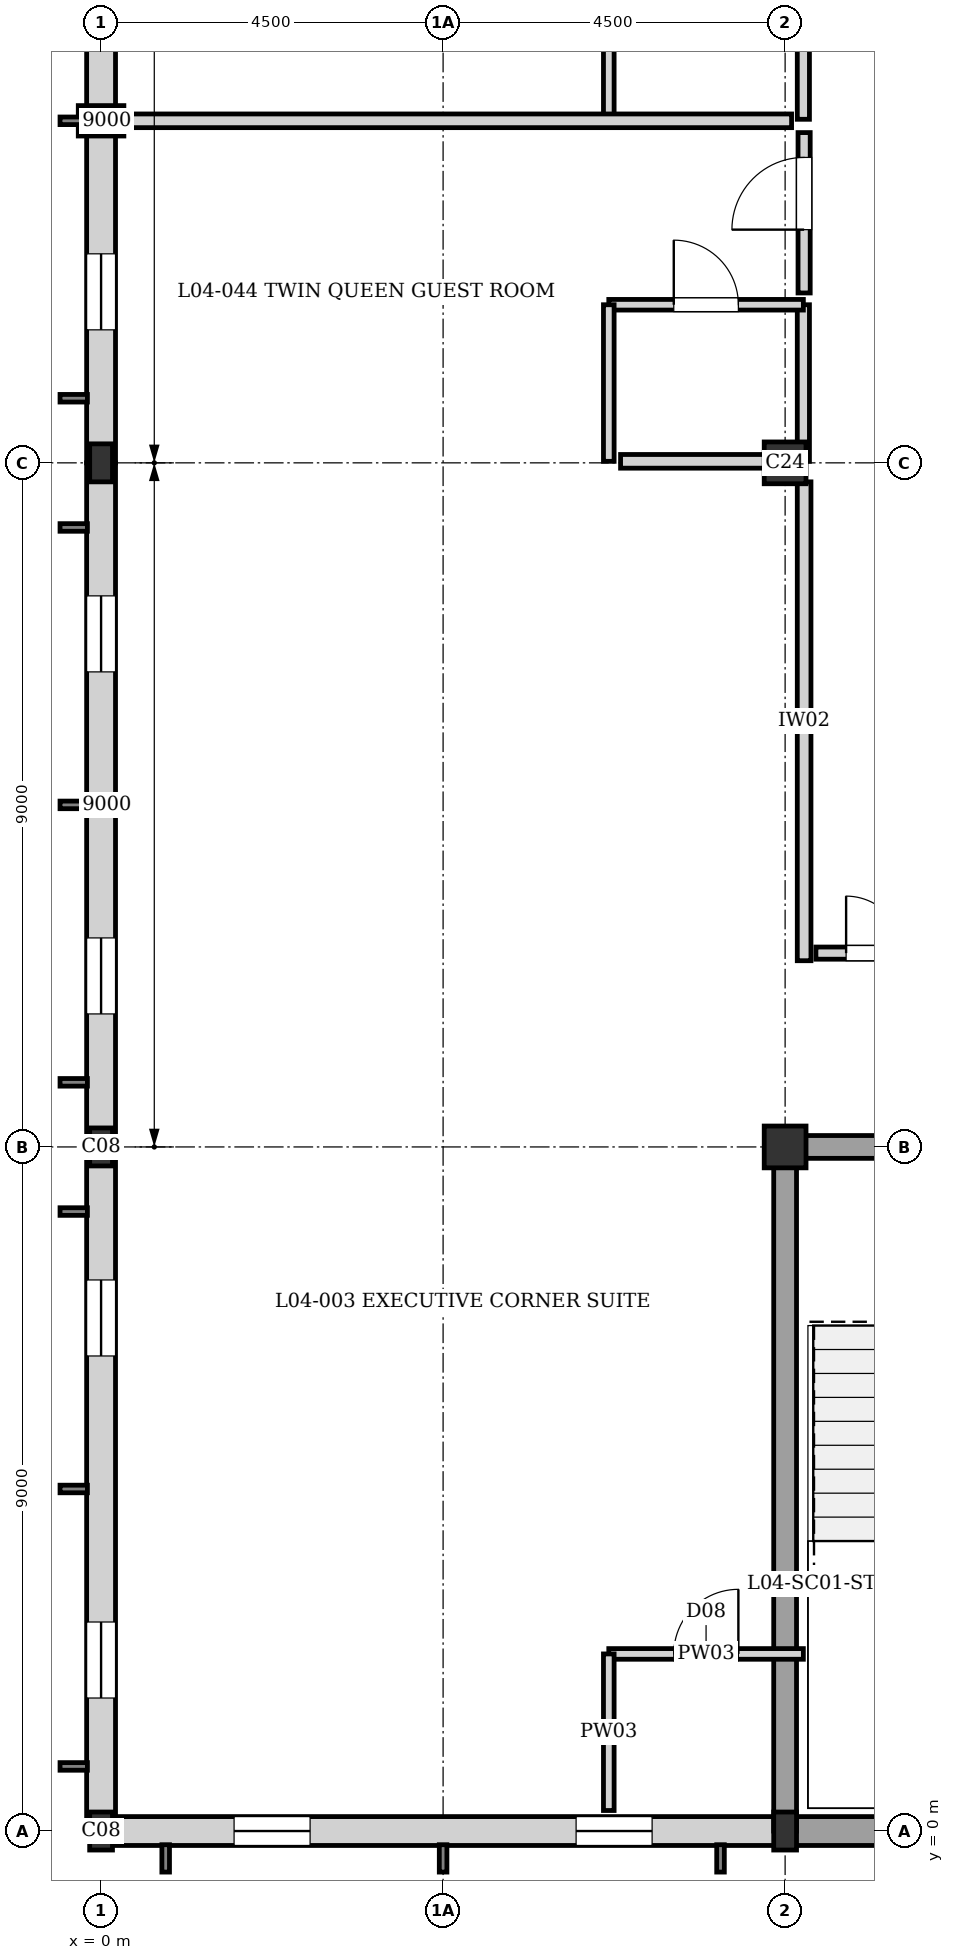
"""IFC4 building model, lengths in metres.
Left out: names, types, materials, properties, quantities, classifications, styles, units other than length and angle.
Written with IfcOpenShell. Run it as: python <this file> out.ifc"""

import sys

from ifc_helpers import new_model, si_unit, direction, frame, frame_2d, origin, origin_2d, place, context, subcontext, project, spatial, rectangle, i_section, extrude, element, fill, save


model = new_model("IFC4")
c1 = context("Model", 3, precision=1e-05, world=origin(), true_north=direction((0.0, 1.0)))
c2 = subcontext(c1, "Body", "Model", "MODEL_VIEW")
j1 = project(units=[si_unit("LENGTHUNIT", "METRE"), si_unit("PLANEANGLEUNIT", "RADIAN")], contexts=[c1])
p1 = place(None, origin())
s1 = spatial("IfcSite", under=j1, at=p1, CompositionType="ELEMENT")
p2 = place(p1, origin())
s2 = spatial("IfcBuilding", under=s1, at=p2, CompositionType="ELEMENT")
p3 = place(p2, frame((0.0, 0.0, 14.56)))
s3 = spatial("IfcBuildingStorey", under=s2, at=p3, CompositionType="ELEMENT", Elevation=14.56)
for number, where, z_axis, x_axis in (
    (1, (0.0, 0.0, 0.0), (0.0, 0.0, 1.0), (1.0, 0.0, 0.0)),
    (2, (0.0, 9.0, 0.0), (0.0, 0.0, 1.0), (1.0, 0.0, 0.0)),
    (3, (0.0, 18.0, 0.0), (0.0, 0.0, 1.0), (1.0, 0.0, 0.0)),
    (4, (9.0, 0.0, 0.0), (0.0, 0.0, 1.0), (1.0, 0.0, 0.0)),
):
    element("IfcColumn", number, at=place(p3, frame(where, z_axis=z_axis, x_axis=x_axis)), inside=s3, PredefinedType="COLUMN", context=c2, shape_type="SweptSolid", body=[
        extrude(i_section(OverallWidth=0.3, OverallDepth=0.5, WebThickness=0.014, FlangeThickness=0.028, at=origin_2d()), origin(), (0.0, 0.0, 1.0), 3.04),
    ])
for number, where, z_axis, x_axis in (
    (5, (9.0, 9.0, 0.0), (0.0, 0.0, 1.0), (1.0, 0.0, 0.0)),
    (6, (9.0, 18.0, 0.0), (0.0, 0.0, 1.0), (1.0, 0.0, 0.0)),
):
    element("IfcColumn", number, at=place(p3, frame(where, z_axis=z_axis, x_axis=x_axis)), inside=s3, PredefinedType="COLUMN", context=c2, shape_type="SweptSolid", body=[
        extrude(rectangle(XDim=0.55, YDim=0.55, at=origin_2d()), origin(), (0.0, 0.0, 1.0), 3.04),
    ])
p4 = place(p3, frame((0.0, 22.5, 0.0), z_axis=(0.0, 0.0, 1.0), x_axis=(0.0, 1.0, 0.0)))
e7 = element("IfcColumn", 7, at=p4, inside=s3, PredefinedType="PILASTER", context=c2, shape_type="SweptSolid", body=[
    extrude(rectangle(XDim=0.4, YDim=0.6, at=origin_2d()), origin(), (0.0, 0.0, 1.0), 3.04),
])
p5 = place(p3, frame((18.0, 0.0, 0.0), z_axis=(0.0, 0.0, 1.0), x_axis=(-1.0, 0.0, 0.0)))
e8 = element("IfcWall", 8, at=p5, inside=s3, PredefinedType="SOLIDWALL", context=c2, shape_type="SweptSolid", body=[
    extrude(rectangle(XDim=9.0, YDim=0.38, at=frame_2d((4.5, 0.0))), origin(), (0.0, 0.0, 1.0), 2.82),
])
p6 = place(p3, frame((8.87, 0.0, 0.0), z_axis=(0.0, 0.0, 1.0), x_axis=(-1.0, 0.0, 0.0)))
e9 = element("IfcWall", 9, at=p6, inside=s3, PredefinedType="SOLIDWALL", context=c2, shape_type="SweptSolid", body=[
    extrude(rectangle(XDim=8.87, YDim=0.38, at=frame_2d((4.435, 0.0))), origin(), (0.0, 0.0, 1.0), 2.42),
])
p7 = place(p6, frame((1.62, 0.0, 0.35)))
e10 = element("IfcOpeningElement", 10, at=p7, cuts=e9, PredefinedType="OPENING", context=c2, shape_type="SweptSolid", body=[
    extrude(rectangle(XDim=1.0, YDim=1.6, at=frame_2d((0.5, 0.8))), frame((0.0, 0.2, 0.0), z_axis=(0.0, -1.0, 0.0), x_axis=(1.0, 0.0, 0.0)), (0.0, 0.0, 1.0), 0.4),
])
p8 = place(p6, frame((6.12, 0.0, 0.35)))
e11 = element("IfcOpeningElement", 11, at=p8, cuts=e9, PredefinedType="OPENING", context=c2, shape_type="SweptSolid", body=[
    extrude(rectangle(XDim=1.0, YDim=1.6, at=frame_2d((0.5, 0.8))), frame((0.0, 0.2, 0.0), z_axis=(0.0, -1.0, 0.0), x_axis=(1.0, 0.0, 0.0)), (0.0, 0.0, 1.0), 0.4),
])
p9 = place(p3, frame((0.0, 0.155, 0.0), z_axis=(0.0, 0.0, 1.0), x_axis=(0.0, 1.0, 0.0)))
e12 = element("IfcWall", 12, at=p9, inside=s3, PredefinedType="SOLIDWALL", context=c2, shape_type="SweptSolid", body=[
    extrude(rectangle(XDim=8.845, YDim=0.38, at=frame_2d((4.422, 0.0))), origin(), (0.0, 0.0, 1.0), 2.38),
])
p10 = place(p9, frame((1.595, 0.0, 0.35)))
e13 = element("IfcOpeningElement", 13, at=p10, cuts=e12, PredefinedType="OPENING", context=c2, shape_type="SweptSolid", body=[
    extrude(rectangle(XDim=1.0, YDim=1.6, at=frame_2d((0.5, 0.8))), frame((0.0, 0.2, 0.0), z_axis=(0.0, -1.0, 0.0), x_axis=(1.0, 0.0, 0.0)), (0.0, 0.0, 1.0), 0.4),
])
p11 = place(p9, frame((6.095, 0.0, 0.35)))
e14 = element("IfcOpeningElement", 14, at=p11, cuts=e12, PredefinedType="OPENING", context=c2, shape_type="SweptSolid", body=[
    extrude(rectangle(XDim=1.0, YDim=1.6, at=frame_2d((0.5, 0.8))), frame((0.0, 0.2, 0.0), z_axis=(0.0, -1.0, 0.0), x_axis=(1.0, 0.0, 0.0)), (0.0, 0.0, 1.0), 0.4),
])
p12 = place(p3, frame((0.0, 9.0, 0.0), z_axis=(0.0, 0.0, 1.0), x_axis=(0.0, 1.0, 0.0)))
e15 = element("IfcWall", 15, at=p12, inside=s3, PredefinedType="SOLIDWALL", context=c2, shape_type="SweptSolid", body=[
    extrude(rectangle(XDim=9.0, YDim=0.38, at=frame_2d((4.5, 0.0))), origin(), (0.0, 0.0, 1.0), 2.82),
])
p13 = place(p12, frame((1.75, 0.0, 0.35)))
e16 = element("IfcOpeningElement", 16, at=p13, cuts=e15, PredefinedType="OPENING", context=c2, shape_type="SweptSolid", body=[
    extrude(rectangle(XDim=1.0, YDim=1.6, at=frame_2d((0.5, 0.8))), frame((0.0, 0.2, 0.0), z_axis=(0.0, -1.0, 0.0), x_axis=(1.0, 0.0, 0.0)), (0.0, 0.0, 1.0), 0.4),
])
p14 = place(p12, frame((6.25, 0.0, 0.35)))
e17 = element("IfcOpeningElement", 17, at=p14, cuts=e15, PredefinedType="OPENING", context=c2, shape_type="SweptSolid", body=[
    extrude(rectangle(XDim=1.0, YDim=1.6, at=frame_2d((0.5, 0.8))), frame((0.0, 0.2, 0.0), z_axis=(0.0, -1.0, 0.0), x_axis=(1.0, 0.0, 0.0)), (0.0, 0.0, 1.0), 0.4),
])
p15 = place(p3, frame((0.0, 18.0, 0.0), z_axis=(0.0, 0.0, 1.0), x_axis=(0.0, 1.0, 0.0)))
e18 = element("IfcWall", 18, at=p15, inside=s3, PredefinedType="SOLIDWALL", context=c2, shape_type="SweptSolid", body=[
    extrude(rectangle(XDim=9.0, YDim=0.38, at=frame_2d((4.5, 0.0))), origin(), (0.0, 0.0, 1.0), 2.48),
])
p16 = place(p15, frame((1.75, 0.0, 0.35)))
e19 = element("IfcOpeningElement", 19, at=p16, cuts=e18, PredefinedType="OPENING", context=c2, shape_type="SweptSolid", body=[
    extrude(rectangle(XDim=1.0, YDim=1.6, at=frame_2d((0.5, 0.8))), frame((0.0, 0.2, 0.0), z_axis=(0.0, -1.0, 0.0), x_axis=(1.0, 0.0, 0.0)), (0.0, 0.0, 1.0), 0.4),
])
p17 = place(p15, frame((6.25, 0.0, 0.35)))
e20 = element("IfcOpeningElement", 20, at=p17, cuts=e18, PredefinedType="OPENING", context=c2, shape_type="SweptSolid", body=[
    extrude(rectangle(XDim=1.0, YDim=1.6, at=frame_2d((0.5, 0.8))), frame((0.0, 0.2, 0.0), z_axis=(0.0, -1.0, 0.0), x_axis=(1.0, 0.0, 0.0)), (0.0, 0.0, 1.0), 0.4),
])
p18 = place(p3, frame((9.0, 9.0, 0.0), z_axis=(0.0, 0.0, 1.0), x_axis=(1.0, 0.0, 0.0)))
e21 = element("IfcWall", 21, at=p18, inside=s3, PredefinedType="SHEAR", context=c2, shape_type="SweptSolid", body=[
    extrude(rectangle(XDim=9.0, YDim=0.3, at=frame_2d((4.5, 0.0))), origin(), (0.0, 0.0, 1.0), 2.82),
])
p19 = place(p18, frame((5.95, 0.0, 0.0)))
e22 = element("IfcOpeningElement", 22, at=p19, cuts=e21, PredefinedType="OPENING", context=c2, shape_type="SweptSolid", body=[
    extrude(rectangle(XDim=1.6, YDim=2.1, at=frame_2d((0.8, 1.05))), frame((0.0, 0.16, 0.0), z_axis=(0.0, -1.0, 0.0), x_axis=(1.0, 0.0, 0.0)), (0.0, 0.0, 1.0), 0.32),
])
p20 = place(p3, frame((9.0, 0.0, 0.0), z_axis=(0.0, 0.0, 1.0), x_axis=(0.0, 1.0, 0.0)))
e23 = element("IfcWall", 23, at=p20, inside=s3, PredefinedType="SHEAR", context=c2, shape_type="SweptSolid", body=[
    extrude(rectangle(XDim=9.0, YDim=0.3, at=frame_2d((4.5, 0.0))), origin(), (0.0, 0.0, 1.0), 2.82),
])
p21 = place(p3, frame((6.68, 2.33, 0.0), z_axis=(0.0, 0.0, 1.0), x_axis=(1.0, 0.0, 0.0)))
e24 = element("IfcWall", 24, at=p21, inside=s3, PredefinedType="PLUMBINGWALL", context=c2, shape_type="SweptSolid", body=[
    extrude(rectangle(XDim=2.56, YDim=0.14, at=frame_2d((1.28, 0.0))), origin(), (0.0, 0.0, 1.0), 2.82),
])
p22 = place(p21, frame((0.855, 0.0, 0.0)))
e25 = element("IfcOpeningElement", 25, at=p22, cuts=e24, PredefinedType="OPENING", context=c2, shape_type="SweptSolid", body=[
    extrude(rectangle(XDim=0.85, YDim=2.04, at=frame_2d((0.425, 1.02))), frame((0.0, 0.08, 0.0), z_axis=(0.0, -1.0, 0.0), x_axis=(1.0, 0.0, 0.0)), (0.0, 0.0, 1.0), 0.16),
])
p23 = place(p3, frame((6.68, 0.27, 0.0), z_axis=(0.0, 0.0, 1.0), x_axis=(0.0, 1.0, 0.0)))
e26 = element("IfcWall", 26, at=p23, inside=s3, PredefinedType="PLUMBINGWALL", context=c2, shape_type="SweptSolid", body=[
    extrude(rectangle(XDim=2.06, YDim=0.14, at=frame_2d((1.03, 0.0))), origin(), (0.0, 0.0, 1.0), 2.82),
])
p24 = place(p3, frame((9.24, 18.02, 0.0), z_axis=(0.0, 0.0, 1.0), x_axis=(0.0, 1.0, 0.0)))
e27 = element("IfcWall", 27, at=p24, inside=s3, PredefinedType="PARTITIONING", context=c2, shape_type="SweptSolid", body=[
    extrude(rectangle(XDim=2.06, YDim=0.16, at=frame_2d((1.03, 0.0))), origin(), (0.0, 0.0, 1.0), 2.82),
])
p25 = place(p3, frame((6.68, 20.08, 0.0), z_axis=(0.0, 0.0, 1.0), x_axis=(1.0, 0.0, 0.0)))
e28 = element("IfcWall", 28, at=p25, inside=s3, PredefinedType="PLUMBINGWALL", context=c2, shape_type="SweptSolid", body=[
    extrude(rectangle(XDim=2.56, YDim=0.14, at=frame_2d((1.28, 0.0))), origin(), (0.0, 0.0, 1.0), 2.82),
])
p26 = place(p25, frame((0.855, 0.0, 0.0)))
e29 = element("IfcOpeningElement", 29, at=p26, cuts=e28, PredefinedType="OPENING", context=c2, shape_type="SweptSolid", body=[
    extrude(rectangle(XDim=0.85, YDim=2.04, at=frame_2d((0.425, 1.02))), frame((0.0, 0.08, 0.0), z_axis=(0.0, -1.0, 0.0), x_axis=(1.0, 0.0, 0.0)), (0.0, 0.0, 1.0), 0.16),
])
p27 = place(p3, frame((6.68, 18.02, 0.0), z_axis=(0.0, 0.0, 1.0), x_axis=(0.0, 1.0, 0.0)))
e30 = element("IfcWall", 30, at=p27, inside=s3, PredefinedType="PLUMBINGWALL", context=c2, shape_type="SweptSolid", body=[
    extrude(rectangle(XDim=2.06, YDim=0.14, at=frame_2d((1.03, 0.0))), origin(), (0.0, 0.0, 1.0), 2.82),
])
p28 = place(p3, frame((9.24, 22.52, 0.0), z_axis=(0.0, 0.0, 1.0), x_axis=(0.0, 1.0, 0.0)))
e31 = element("IfcWall", 31, at=p28, inside=s3, PredefinedType="PARTITIONING", context=c2, shape_type="SweptSolid", body=[
    extrude(rectangle(XDim=2.06, YDim=0.16, at=frame_2d((1.03, 0.0))), origin(), (0.0, 0.0, 1.0), 2.82),
])
p29 = place(p3, frame((6.68, 22.52, 0.0), z_axis=(0.0, 0.0, 1.0), x_axis=(0.0, 1.0, 0.0)))
e32 = element("IfcWall", 32, at=p29, inside=s3, PredefinedType="PLUMBINGWALL", context=c2, shape_type="SweptSolid", body=[
    extrude(rectangle(XDim=2.06, YDim=0.14, at=frame_2d((1.03, 0.0))), origin(), (0.0, 0.0, 1.0), 2.82),
])
p30 = place(p3, frame((9.25, 11.45, 0.0), z_axis=(0.0, 0.0, 1.0), x_axis=(0.0, 1.0, 0.0)))
e33 = element("IfcWall", 33, at=p30, inside=s3, PredefinedType="PARTITIONING", context=c2, shape_type="SweptSolid", body=[
    extrude(rectangle(XDim=6.3, YDim=0.18, at=frame_2d((3.15, 0.0))), origin(), (0.0, 0.0, 1.0), 2.82),
])
p31 = place(p3, frame((0.195, 22.5, 0.0), z_axis=(0.0, 0.0, 1.0), x_axis=(1.0, 0.0, 0.0)))
e34 = element("IfcWall", 34, at=p31, inside=s3, PredefinedType="PARTITIONING", context=c2, shape_type="SweptSolid", body=[
    extrude(rectangle(XDim=8.89, YDim=0.18, at=frame_2d((4.445, 0.0))), origin(), (0.0, 0.0, 1.0), 2.82),
])
p32 = place(p3, frame((6.835, 18.02, 0.0), z_axis=(0.0, 0.0, 1.0), x_axis=(1.0, 0.0, 0.0)))
e35 = element("IfcWall", 35, at=p32, inside=s3, PredefinedType="PARTITIONING", context=c2, shape_type="SweptSolid", body=[
    extrude(rectangle(XDim=2.26, YDim=0.18, at=frame_2d((1.13, 0.0))), origin(), (0.0, 0.0, 1.0), 2.42),
])
p33 = place(p3, frame((9.405, 11.55, 0.0), z_axis=(0.0, 0.0, 1.0), x_axis=(1.0, 0.0, 0.0)))
e36 = element("IfcWall", 36, at=p33, inside=s3, PredefinedType="PARTITIONING", context=c2, shape_type="SweptSolid", body=[
    extrude(rectangle(XDim=2.295, YDim=0.16, at=frame_2d((1.147, 0.0))), origin(), (0.0, 0.0, 1.0), 2.82),
])
p34 = place(p33, frame((0.397, 0.0, 0.0)))
e37 = element("IfcOpeningElement", 37, at=p34, cuts=e36, PredefinedType="OPENING", context=c2, shape_type="SweptSolid", body=[
    extrude(rectangle(XDim=1.5, YDim=2.1, at=frame_2d((0.75, 1.05))), frame((0.0, 0.09, 0.0), z_axis=(0.0, -1.0, 0.0), x_axis=(1.0, 0.0, 0.0)), (0.0, 0.0, 1.0), 0.18),
])
p35 = place(p3, frame((9.25, 20.235, 0.0), z_axis=(0.0, 0.0, 1.0), x_axis=(0.0, 1.0, 0.0)))
e38 = element("IfcWall", 38, at=p35, inside=s3, PredefinedType="PARTITIONING", context=c2, shape_type="SweptSolid", body=[
    extrude(rectangle(XDim=2.11, YDim=0.16, at=frame_2d((1.055, 0.0))), origin(), (0.0, 0.0, 1.0), 2.82),
])
p36 = place(p35, frame((0.833, 0.0, 0.0)))
e39 = element("IfcOpeningElement", 39, at=p36, cuts=e38, PredefinedType="OPENING", context=c2, shape_type="SweptSolid", body=[
    extrude(rectangle(XDim=0.95, YDim=2.15, at=frame_2d((0.475, 1.075))), frame((0.0, 0.09, 0.0), z_axis=(0.0, -1.0, 0.0), x_axis=(1.0, 0.0, 0.0)), (0.0, 0.0, 1.0), 0.18),
])
p37 = place(p7, origin())
e40 = element("IfcWindow", 40, at=p37, inside=s3, PartitioningType="SINGLE_PANEL", PredefinedType="WINDOW", context=c2, shape_type="SweptSolid", body=[
    extrude(rectangle(XDim=1.0, YDim=1.6, at=frame_2d((0.5, 0.8))), frame((0.0, 0.03, 0.0), z_axis=(0.0, -1.0, 0.0), x_axis=(1.0, 0.0, 0.0)), (0.0, 0.0, 1.0), 0.06),
])
fill(e10, e40)
p38 = place(p8, origin())
e41 = element("IfcWindow", 41, at=p38, inside=s3, PartitioningType="SINGLE_PANEL", PredefinedType="WINDOW", context=c2, shape_type="SweptSolid", body=[
    extrude(rectangle(XDim=1.0, YDim=1.6, at=frame_2d((0.5, 0.8))), frame((0.0, 0.03, 0.0), z_axis=(0.0, -1.0, 0.0), x_axis=(1.0, 0.0, 0.0)), (0.0, 0.0, 1.0), 0.06),
])
fill(e11, e41)
p39 = place(p10, origin())
e42 = element("IfcWindow", 42, at=p39, inside=s3, PartitioningType="SINGLE_PANEL", PredefinedType="WINDOW", context=c2, shape_type="SweptSolid", body=[
    extrude(rectangle(XDim=1.0, YDim=1.6, at=frame_2d((0.5, 0.8))), frame((0.0, 0.03, 0.0), z_axis=(0.0, -1.0, 0.0), x_axis=(1.0, 0.0, 0.0)), (0.0, 0.0, 1.0), 0.06),
])
fill(e13, e42)
p40 = place(p11, origin())
e43 = element("IfcWindow", 43, at=p40, inside=s3, PartitioningType="SINGLE_PANEL", PredefinedType="WINDOW", context=c2, shape_type="SweptSolid", body=[
    extrude(rectangle(XDim=1.0, YDim=1.6, at=frame_2d((0.5, 0.8))), frame((0.0, 0.03, 0.0), z_axis=(0.0, -1.0, 0.0), x_axis=(1.0, 0.0, 0.0)), (0.0, 0.0, 1.0), 0.06),
])
fill(e14, e43)
p41 = place(p13, origin())
e44 = element("IfcWindow", 44, at=p41, inside=s3, PartitioningType="SINGLE_PANEL", PredefinedType="WINDOW", context=c2, shape_type="SweptSolid", body=[
    extrude(rectangle(XDim=1.0, YDim=1.6, at=frame_2d((0.5, 0.8))), frame((0.0, 0.03, 0.0), z_axis=(0.0, -1.0, 0.0), x_axis=(1.0, 0.0, 0.0)), (0.0, 0.0, 1.0), 0.06),
])
fill(e16, e44)
p42 = place(p14, origin())
e45 = element("IfcWindow", 45, at=p42, inside=s3, PartitioningType="SINGLE_PANEL", PredefinedType="WINDOW", context=c2, shape_type="SweptSolid", body=[
    extrude(rectangle(XDim=1.0, YDim=1.6, at=frame_2d((0.5, 0.8))), frame((0.0, 0.03, 0.0), z_axis=(0.0, -1.0, 0.0), x_axis=(1.0, 0.0, 0.0)), (0.0, 0.0, 1.0), 0.06),
])
fill(e17, e45)
p43 = place(p16, origin())
e46 = element("IfcWindow", 46, at=p43, inside=s3, PartitioningType="SINGLE_PANEL", PredefinedType="WINDOW", context=c2, shape_type="SweptSolid", body=[
    extrude(rectangle(XDim=1.0, YDim=1.6, at=frame_2d((0.5, 0.8))), frame((0.0, 0.03, 0.0), z_axis=(0.0, -1.0, 0.0), x_axis=(1.0, 0.0, 0.0)), (0.0, 0.0, 1.0), 0.06),
])
fill(e19, e46)
p44 = place(p22, origin())
e47 = element("IfcDoor", 47, at=p44, inside=s3, OperationType="SINGLE_SWING_RIGHT", PredefinedType="DOOR", context=c2, shape_type="SweptSolid", body=[
    extrude(rectangle(XDim=0.85, YDim=2.04, at=frame_2d((0.425, 1.02))), frame((0.0, 0.025, 0.0), z_axis=(0.0, -1.0, 0.0), x_axis=(1.0, 0.0, 0.0)), (0.0, 0.0, 1.0), 0.05),
])
fill(e25, e47)
p45 = place(p26, origin())
e48 = element("IfcDoor", 48, at=p45, inside=s3, OperationType="SINGLE_SWING_LEFT", PredefinedType="DOOR", context=c2, shape_type="SweptSolid", body=[
    extrude(rectangle(XDim=0.85, YDim=2.04, at=frame_2d((0.425, 1.02))), frame((0.0, 0.025, 0.0), z_axis=(0.0, -1.0, 0.0), x_axis=(1.0, 0.0, 0.0)), (0.0, 0.0, 1.0), 0.05),
])
fill(e29, e48)
p46 = place(p34, origin())
e49 = element("IfcDoor", 49, at=p46, inside=s3, OperationType="DOUBLE_DOOR_SINGLE_SWING", PredefinedType="DOOR", context=c2, shape_type="SweptSolid", body=[
    extrude(rectangle(XDim=1.5, YDim=2.1, at=frame_2d((0.75, 1.05))), frame((0.0, 0.025, 0.0), z_axis=(0.0, -1.0, 0.0), x_axis=(1.0, 0.0, 0.0)), (0.0, 0.0, 1.0), 0.05),
])
fill(e37, e49)
p47 = place(p36, origin())
e50 = element("IfcDoor", 50, at=p47, inside=s3, OperationType="SINGLE_SWING_LEFT", PredefinedType="DOOR", context=c2, shape_type="SweptSolid", body=[
    extrude(rectangle(XDim=0.95, YDim=2.15, at=frame_2d((0.475, 1.075))), frame((0.0, 0.025, 0.0), z_axis=(0.0, -1.0, 0.0), x_axis=(1.0, 0.0, 0.0)), (0.0, 0.0, 1.0), 0.05),
])
fill(e39, e50)
save(model, sys.argv[1])
